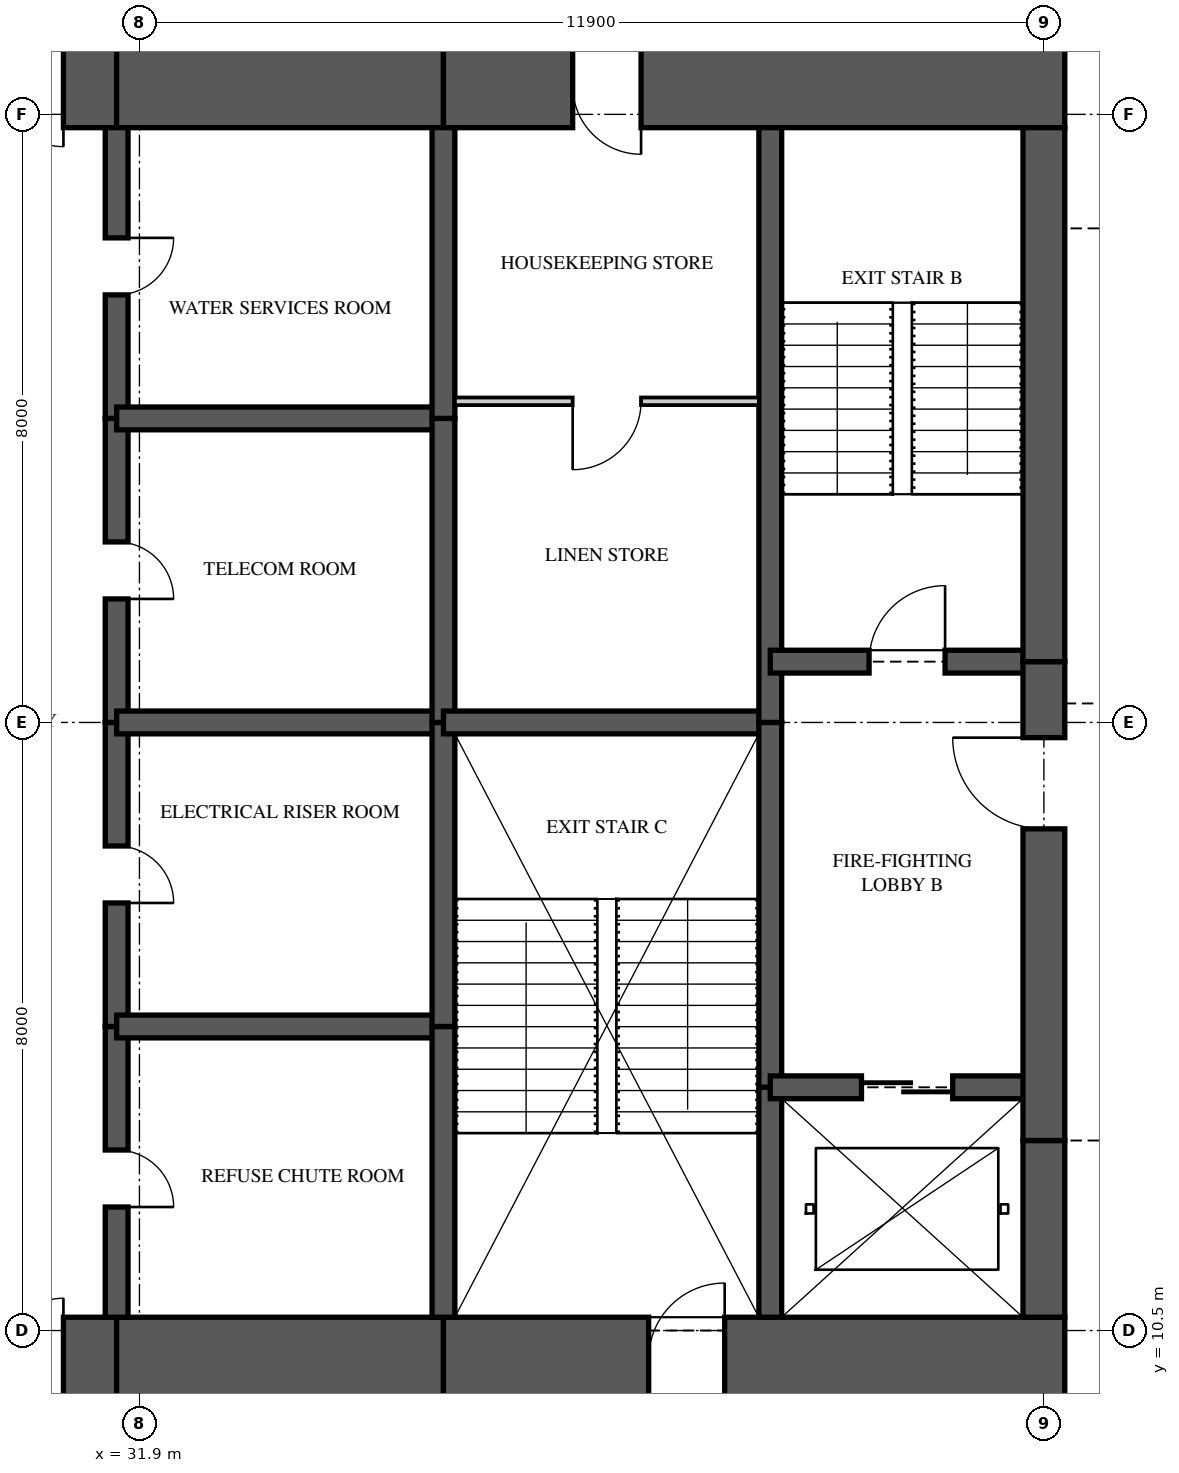
"""IFC4 building model, lengths in metres.
Left out: names, types, materials, properties, quantities, classifications, styles, units other than length and angle.
Written with IfcOpenShell. Run it as: python <this file> out.ifc"""

import sys

from ifc_helpers import new_model, si_unit, direction, frame, frame_2d, origin, place, context, subcontext, project, spatial, rectangle, extrude, element, fill, save


model = new_model("IFC4")
c1 = context("Model", 3, precision=1e-05, world=origin(), true_north=direction((0.0, 1.0)))
c2 = subcontext(c1, "Body", "Model", "MODEL_VIEW")
j1 = project(units=[si_unit("LENGTHUNIT", "METRE"), si_unit("PLANEANGLEUNIT", "RADIAN")], contexts=[c1])
p1 = place(None, origin())
s1 = spatial("IfcSite", under=j1, at=p1, CompositionType="ELEMENT")
p2 = place(p1, origin())
s2 = spatial("IfcBuilding", under=s1, at=p2, CompositionType="ELEMENT")
p3 = place(p2, frame((0.0, 0.0, 228.45)))
s3 = spatial("IfcBuildingStorey", under=s2, at=p3, CompositionType="ELEMENT", Elevation=228.45)
p4 = place(p3, frame((26.0, 10.125, 0.0), z_axis=(0.0, 0.0, 1.0), x_axis=(1.0, 0.0, 0.0)))
e1 = element("IfcWall", 1, at=p4, inside=s3, PredefinedType="SHEAR", context=c2, shape_type="SweptSolid", body=[
    extrude(rectangle(XDim=5.6, YDim=1.1, at=frame_2d((2.8, 0.0))), origin(), (0.0, 0.0, 1.0), 3.5),
])
p5 = place(p4, frame((3.3, 0.0, 0.0)))
e2 = element("IfcOpeningElement", 2, at=p5, cuts=e1, PredefinedType="OPENING", context=c2, shape_type="SweptSolid", body=[
    extrude(rectangle(XDim=1.6, YDim=2.1, at=frame_2d((0.8, 1.05))), frame((0.0, 0.56, 0.0), z_axis=(0.0, -1.0, 0.0), x_axis=(1.0, 0.0, 0.0)), (0.0, 0.0, 1.0), 1.12),
])
p6 = place(p3, frame((31.6, 10.125, 0.0), z_axis=(0.0, 0.0, 1.0), x_axis=(1.0, 0.0, 0.0)))
e3 = element("IfcWall", 3, at=p6, inside=s3, PredefinedType="SHEAR", context=c2, shape_type="SweptSolid", body=[
    extrude(rectangle(XDim=4.3, YDim=1.1, at=frame_2d((2.15, 0.0))), origin(), (0.0, 0.0, 1.0), 3.5),
])
p7 = place(p3, frame((35.9, 10.125, 0.0), z_axis=(0.0, 0.0, 1.0), x_axis=(1.0, 0.0, 0.0)))
e4 = element("IfcWall", 4, at=p7, inside=s3, PredefinedType="SHEAR", context=c2, shape_type="SweptSolid", body=[
    extrude(rectangle(XDim=8.175, YDim=1.1, at=frame_2d((4.087, 0.0))), origin(), (0.0, 0.0, 1.0), 3.5),
])
p8 = place(p7, frame((2.7, 0.0, 0.0)))
e5 = element("IfcOpeningElement", 5, at=p8, cuts=e4, PredefinedType="OPENING", context=c2, shape_type="SweptSolid", body=[
    extrude(rectangle(XDim=1.0, YDim=2.1, at=frame_2d((0.5, 1.05))), frame((0.0, 0.56, 0.0), z_axis=(0.0, -1.0, 0.0), x_axis=(1.0, 0.0, 0.0)), (0.0, 0.0, 1.0), 1.12),
])
p9 = place(p3, frame((44.075, 26.875, 0.0), z_axis=(0.0, 0.0, 1.0), x_axis=(-1.0, 0.0, 0.0)))
e6 = element("IfcWall", 6, at=p9, inside=s3, PredefinedType="SHEAR", context=c2, shape_type="SweptSolid", body=[
    extrude(rectangle(XDim=8.175, YDim=1.1, at=frame_2d((4.087, 0.0))), origin(), (0.0, 0.0, 1.0), 3.5),
])
p10 = place(p9, frame((5.575, 0.0, 0.0)))
e7 = element("IfcOpeningElement", 7, at=p10, cuts=e6, PredefinedType="OPENING", context=c2, shape_type="SweptSolid", body=[
    extrude(rectangle(XDim=0.9, YDim=2.1, at=frame_2d((0.45, 1.05))), frame((0.0, 0.56, 0.0), z_axis=(0.0, -1.0, 0.0), x_axis=(1.0, 0.0, 0.0)), (0.0, 0.0, 1.0), 1.12),
])
p11 = place(p3, frame((35.9, 26.875, 0.0), z_axis=(0.0, 0.0, 1.0), x_axis=(-1.0, 0.0, 0.0)))
e8 = element("IfcWall", 8, at=p11, inside=s3, PredefinedType="SHEAR", context=c2, shape_type="SweptSolid", body=[
    extrude(rectangle(XDim=4.3, YDim=1.1, at=frame_2d((2.15, 0.0))), origin(), (0.0, 0.0, 1.0), 3.5),
])
p12 = place(p3, frame((31.6, 26.875, 0.0), z_axis=(0.0, 0.0, 1.0), x_axis=(-1.0, 0.0, 0.0)))
e9 = element("IfcWall", 9, at=p12, inside=s3, PredefinedType="SHEAR", context=c2, shape_type="SweptSolid", body=[
    extrude(rectangle(XDim=5.6, YDim=1.1, at=frame_2d((2.8, 0.0))), origin(), (0.0, 0.0, 1.0), 3.5),
])
p13 = place(p12, frame((0.7, 0.0, 0.0)))
e10 = element("IfcOpeningElement", 10, at=p13, cuts=e9, PredefinedType="OPENING", context=c2, shape_type="SweptSolid", body=[
    extrude(rectangle(XDim=1.6, YDim=2.1, at=frame_2d((0.8, 1.05))), frame((0.0, 0.56, 0.0), z_axis=(0.0, -1.0, 0.0), x_axis=(1.0, 0.0, 0.0)), (0.0, 0.0, 1.0), 1.12),
])
p14 = place(p3, frame((43.8, 10.675, 0.0), z_axis=(0.0, 0.0, 1.0), x_axis=(0.0, 1.0, 0.0)))
e11 = element("IfcWall", 11, at=p14, inside=s3, PredefinedType="SHEAR", context=c2, shape_type="SweptSolid", body=[
    extrude(rectangle(XDim=2.325, YDim=0.55, at=frame_2d((1.163, 0.0))), origin(), (0.0, 0.0, 1.0), 3.5),
])
p15 = place(p3, frame((43.8, 13.0, 0.0), z_axis=(0.0, 0.0, 1.0), x_axis=(0.0, 1.0, 0.0)))
e12 = element("IfcWall", 12, at=p15, inside=s3, PredefinedType="SHEAR", context=c2, shape_type="SweptSolid", body=[
    extrude(rectangle(XDim=6.3, YDim=0.55, at=frame_2d((3.15, 0.0))), origin(), (0.0, 0.0, 1.0), 3.5),
])
p16 = place(p15, frame((4.1, 0.0, 0.0)))
e13 = element("IfcOpeningElement", 13, at=p16, cuts=e12, PredefinedType="OPENING", context=c2, shape_type="SweptSolid", body=[
    extrude(rectangle(XDim=1.2, YDim=2.2, at=frame_2d((0.6, 1.1))), frame((0.0, 0.285, 0.0), z_axis=(0.0, -1.0, 0.0), x_axis=(1.0, 0.0, 0.0)), (0.0, 0.0, 1.0), 0.57),
])
p17 = place(p3, frame((43.8, 19.3, 0.0), z_axis=(0.0, 0.0, 1.0), x_axis=(0.0, 1.0, 0.0)))
e14 = element("IfcWall", 14, at=p17, inside=s3, PredefinedType="SHEAR", context=c2, shape_type="SweptSolid", body=[
    extrude(rectangle(XDim=7.025, YDim=0.55, at=frame_2d((3.512, 0.0))), origin(), (0.0, 0.0, 1.0), 3.5),
])
p18 = place(p3, frame((31.6, 10.675, 0.0), z_axis=(0.0, 0.0, 1.0), x_axis=(0.0, 1.0, 0.0)))
e15 = element("IfcWall", 15, at=p18, inside=s3, PredefinedType="SHEAR", context=c2, shape_type="SweptSolid", body=[
    extrude(rectangle(XDim=3.825, YDim=0.3, at=frame_2d((1.913, 0.0))), origin(), (0.0, 0.0, 1.0), 3.5),
])
p19 = place(p18, frame((1.45, 0.0, 0.0)))
e16 = element("IfcOpeningElement", 16, at=p19, cuts=e15, PredefinedType="OPENING", context=c2, shape_type="SweptSolid", body=[
    extrude(rectangle(XDim=0.75, YDim=2.1, at=frame_2d((0.375, 1.05))), frame((0.0, 0.16, 0.0), z_axis=(0.0, -1.0, 0.0), x_axis=(1.0, 0.0, 0.0)), (0.0, 0.0, 1.0), 0.32),
])
p20 = place(p3, frame((31.6, 14.5, 0.0), z_axis=(0.0, 0.0, 1.0), x_axis=(0.0, 1.0, 0.0)))
e17 = element("IfcWall", 17, at=p20, inside=s3, PredefinedType="SHEAR", context=c2, shape_type="SweptSolid", body=[
    extrude(rectangle(XDim=4.0, YDim=0.3, at=frame_2d((2.0, 0.0))), origin(), (0.0, 0.0, 1.0), 3.5),
])
p21 = place(p20, frame((1.625, 0.0, 0.0)))
e18 = element("IfcOpeningElement", 18, at=p21, cuts=e17, PredefinedType="OPENING", context=c2, shape_type="SweptSolid", body=[
    extrude(rectangle(XDim=0.75, YDim=2.1, at=frame_2d((0.375, 1.05))), frame((0.0, 0.16, 0.0), z_axis=(0.0, -1.0, 0.0), x_axis=(1.0, 0.0, 0.0)), (0.0, 0.0, 1.0), 0.32),
])
p22 = place(p3, frame((31.6, 18.5, 0.0), z_axis=(0.0, 0.0, 1.0), x_axis=(0.0, 1.0, 0.0)))
e19 = element("IfcWall", 19, at=p22, inside=s3, PredefinedType="SHEAR", context=c2, shape_type="SweptSolid", body=[
    extrude(rectangle(XDim=4.0, YDim=0.3, at=frame_2d((2.0, 0.0))), origin(), (0.0, 0.0, 1.0), 3.5),
])
p23 = place(p22, frame((1.625, 0.0, 0.0)))
e20 = element("IfcOpeningElement", 20, at=p23, cuts=e19, PredefinedType="OPENING", context=c2, shape_type="SweptSolid", body=[
    extrude(rectangle(XDim=0.75, YDim=2.1, at=frame_2d((0.375, 1.05))), frame((0.0, 0.16, 0.0), z_axis=(0.0, -1.0, 0.0), x_axis=(1.0, 0.0, 0.0)), (0.0, 0.0, 1.0), 0.32),
])
p24 = place(p3, frame((31.6, 22.5, 0.0), z_axis=(0.0, 0.0, 1.0), x_axis=(0.0, 1.0, 0.0)))
e21 = element("IfcWall", 21, at=p24, inside=s3, PredefinedType="SHEAR", context=c2, shape_type="SweptSolid", body=[
    extrude(rectangle(XDim=3.825, YDim=0.3, at=frame_2d((1.913, 0.0))), origin(), (0.0, 0.0, 1.0), 3.5),
])
p25 = place(p24, frame((1.625, 0.0, 0.0)))
e22 = element("IfcOpeningElement", 22, at=p25, cuts=e21, PredefinedType="OPENING", context=c2, shape_type="SweptSolid", body=[
    extrude(rectangle(XDim=0.75, YDim=2.1, at=frame_2d((0.375, 1.05))), frame((0.0, 0.16, 0.0), z_axis=(0.0, -1.0, 0.0), x_axis=(1.0, 0.0, 0.0)), (0.0, 0.0, 1.0), 0.32),
])
p26 = place(p3, frame((35.9, 10.675, 0.0), z_axis=(0.0, 0.0, 1.0), x_axis=(0.0, 1.0, 0.0)))
e23 = element("IfcWall", 23, at=p26, inside=s3, PredefinedType="SHEAR", context=c2, shape_type="SweptSolid", body=[
    extrude(rectangle(XDim=3.825, YDim=0.3, at=frame_2d((1.913, 0.0))), origin(), (0.0, 0.0, 1.0), 3.5),
])
for number, where, z_axis, x_axis in (
    (24, (35.9, 14.5, 0.0), (0.0, 0.0, 1.0), (0.0, 1.0, 0.0)),
    (25, (35.9, 18.5, 0.0), (0.0, 0.0, 1.0), (0.0, 1.0, 0.0)),
):
    element("IfcWall", number, at=place(p3, frame(where, z_axis=z_axis, x_axis=x_axis)), inside=s3, PredefinedType="SHEAR", context=c2, shape_type="SweptSolid", body=[
        extrude(rectangle(XDim=4.0, YDim=0.3, at=frame_2d((2.0, 0.0))), origin(), (0.0, 0.0, 1.0), 3.5),
    ])
p27 = place(p3, frame((35.9, 22.5, 0.0), z_axis=(0.0, 0.0, 1.0), x_axis=(0.0, 1.0, 0.0)))
e26 = element("IfcWall", 26, at=p27, inside=s3, PredefinedType="SHEAR", context=c2, shape_type="SweptSolid", body=[
    extrude(rectangle(XDim=3.825, YDim=0.3, at=frame_2d((1.913, 0.0))), origin(), (0.0, 0.0, 1.0), 3.5),
])
p28 = place(p3, frame((40.2, 10.675, 0.0), z_axis=(0.0, 0.0, 1.0), x_axis=(0.0, 1.0, 0.0)))
e27 = element("IfcWall", 27, at=p28, inside=s3, PredefinedType="SHEAR", context=c2, shape_type="SweptSolid", body=[
    extrude(rectangle(XDim=3.025, YDim=0.3, at=frame_2d((1.512, 0.0))), origin(), (0.0, 0.0, 1.0), 3.5),
])
p29 = place(p3, frame((40.2, 13.7, 0.0), z_axis=(0.0, 0.0, 1.0), x_axis=(0.0, 1.0, 0.0)))
e28 = element("IfcWall", 28, at=p29, inside=s3, PredefinedType="SHEAR", context=c2, shape_type="SweptSolid", body=[
    extrude(rectangle(XDim=4.8, YDim=0.3, at=frame_2d((2.4, 0.0))), origin(), (0.0, 0.0, 1.0), 3.5),
])
p30 = place(p3, frame((40.2, 18.5, 0.0), z_axis=(0.0, 0.0, 1.0), x_axis=(0.0, 1.0, 0.0)))
e29 = element("IfcWall", 29, at=p30, inside=s3, PredefinedType="SHEAR", context=c2, shape_type="SweptSolid", body=[
    extrude(rectangle(XDim=7.825, YDim=0.3, at=frame_2d((3.913, 0.0))), origin(), (0.0, 0.0, 1.0), 3.5),
])
for number, where, z_axis, x_axis in (
    (30, (31.6, 14.5, 0.0), (0.0, 0.0, 1.0), (1.0, 0.0, 0.0)),
    (31, (31.6, 18.5, 0.0), (0.0, 0.0, 1.0), (1.0, 0.0, 0.0)),
    (32, (31.6, 22.5, 0.0), (0.0, 0.0, 1.0), (1.0, 0.0, 0.0)),
):
    element("IfcWall", number, at=place(p3, frame(where, z_axis=z_axis, x_axis=x_axis)), inside=s3, PredefinedType="SHEAR", context=c2, shape_type="SweptSolid", body=[
        extrude(rectangle(XDim=4.3, YDim=0.3, at=frame_2d((2.15, 0.0))), origin(), (0.0, 0.0, 1.0), 3.5),
    ])
p31 = place(p3, frame((35.9, 18.5, 0.0), z_axis=(0.0, 0.0, 1.0), x_axis=(1.0, 0.0, 0.0)))
e33 = element("IfcWall", 33, at=p31, inside=s3, PredefinedType="SHEAR", context=c2, shape_type="SweptSolid", body=[
    extrude(rectangle(XDim=4.3, YDim=0.3, at=frame_2d((2.15, 0.0))), origin(), (0.0, 0.0, 1.0), 3.5),
])
p32 = place(p3, frame((40.2, 13.7, 0.0), z_axis=(0.0, 0.0, 1.0), x_axis=(1.0, 0.0, 0.0)))
e34 = element("IfcWall", 34, at=p32, inside=s3, PredefinedType="SHEAR", context=c2, shape_type="SweptSolid", body=[
    extrude(rectangle(XDim=3.6, YDim=0.3, at=frame_2d((1.8, 0.0))), origin(), (0.0, 0.0, 1.0), 3.5),
])
p33 = place(p32, frame((1.2, 0.0, 0.0)))
e35 = element("IfcOpeningElement", 35, at=p33, cuts=e34, PredefinedType="OPENING", context=c2, shape_type="SweptSolid", body=[
    extrude(rectangle(XDim=1.2, YDim=2.1, at=frame_2d((0.6, 1.05))), frame((0.0, 0.16, 0.0), z_axis=(0.0, -1.0, 0.0), x_axis=(1.0, 0.0, 0.0)), (0.0, 0.0, 1.0), 0.32),
])
p34 = place(p3, frame((40.2, 19.3, 0.0), z_axis=(0.0, 0.0, 1.0), x_axis=(1.0, 0.0, 0.0)))
e36 = element("IfcWall", 36, at=p34, inside=s3, PredefinedType="SHEAR", context=c2, shape_type="SweptSolid", body=[
    extrude(rectangle(XDim=3.6, YDim=0.3, at=frame_2d((1.8, 0.0))), origin(), (0.0, 0.0, 1.0), 3.5),
])
p35 = place(p34, frame((1.3, 0.0, 0.0)))
e37 = element("IfcOpeningElement", 37, at=p35, cuts=e36, PredefinedType="OPENING", context=c2, shape_type="SweptSolid", body=[
    extrude(rectangle(XDim=1.0, YDim=2.1, at=frame_2d((0.5, 1.05))), frame((0.0, 0.16, 0.0), z_axis=(0.0, -1.0, 0.0), x_axis=(1.0, 0.0, 0.0)), (0.0, 0.0, 1.0), 0.32),
])
p36 = place(p3, frame((36.05, 22.725, 0.0), z_axis=(0.0, 0.0, 1.0), x_axis=(1.0, 0.0, 0.0)))
e38 = element("IfcWall", 38, at=p36, inside=s3, PredefinedType="PARTITIONING", context=c2, shape_type="SweptSolid", body=[
    extrude(rectangle(XDim=4.0, YDim=0.1, at=frame_2d((2.0, 0.0))), origin(), (0.0, 0.0, 1.0), 3.26),
])
p37 = place(p36, frame((1.55, 0.0, 0.0)))
e39 = element("IfcOpeningElement", 39, at=p37, cuts=e38, PredefinedType="OPENING", context=c2, shape_type="SweptSolid", body=[
    extrude(rectangle(XDim=0.9, YDim=2.1, at=frame_2d((0.45, 1.05))), frame((0.0, 0.06, 0.0), z_axis=(0.0, -1.0, 0.0), x_axis=(1.0, 0.0, 0.0)), (0.0, 0.0, 1.0), 0.12),
])
p38 = place(p37, frame((0.9, 0.0, 0.0), z_axis=(0.0, 0.0, 1.0), x_axis=(-1.0, 0.0, 0.0)))
e40 = element("IfcDoor", 40, at=p38, inside=s3, OperationType="SINGLE_SWING_RIGHT", PredefinedType="DOOR", context=c2, shape_type="SweptSolid", body=[
    extrude(rectangle(XDim=0.9, YDim=2.1, at=frame_2d((0.45, 1.05))), frame((0.0, 0.025, 0.0), z_axis=(0.0, -1.0, 0.0), x_axis=(1.0, 0.0, 0.0)), (0.0, 0.0, 1.0), 0.05),
])
fill(e39, e40)
p39 = place(p35, origin())
e41 = element("IfcDoor", 41, at=p39, inside=s3, OperationType="SINGLE_SWING_RIGHT", PredefinedType="DOOR", context=c2, shape_type="SweptSolid", body=[
    extrude(rectangle(XDim=1.0, YDim=2.1, at=frame_2d((0.5, 1.05))), frame((0.0, 0.025, 0.0), z_axis=(0.0, -1.0, 0.0), x_axis=(1.0, 0.0, 0.0)), (0.0, 0.0, 1.0), 0.05),
])
fill(e37, e41)
p40 = place(p16, origin())
e42 = element("IfcDoor", 42, at=p40, inside=s3, OperationType="SINGLE_SWING_RIGHT", PredefinedType="DOOR", context=c2, shape_type="SweptSolid", body=[
    extrude(rectangle(XDim=1.2, YDim=2.2, at=frame_2d((0.6, 1.1))), frame((0.0, 0.025, 0.0), z_axis=(0.0, -1.0, 0.0), x_axis=(1.0, 0.0, 0.0)), (0.0, 0.0, 1.0), 0.05),
])
fill(e13, e42)
p41 = place(p33, origin())
e43 = element("IfcDoor", 43, at=p41, inside=s3, OperationType="SLIDING_TO_LEFT", PredefinedType="DOOR", context=c2, shape_type="SweptSolid", body=[
    extrude(rectangle(XDim=1.2, YDim=2.1, at=frame_2d((0.6, 1.05))), frame((0.0, 0.025, 0.0), z_axis=(0.0, -1.0, 0.0), x_axis=(1.0, 0.0, 0.0)), (0.0, 0.0, 1.0), 0.05),
])
fill(e35, e43)
p42 = place(p5, origin())
e44 = element("IfcDoor", 44, at=p42, inside=s3, OperationType="DOUBLE_DOOR_SINGLE_SWING", PredefinedType="DOOR", context=c2, shape_type="SweptSolid", body=[
    extrude(rectangle(XDim=1.6, YDim=2.1, at=frame_2d((0.8, 1.05))), frame((0.0, 0.025, 0.0), z_axis=(0.0, -1.0, 0.0), x_axis=(1.0, 0.0, 0.0)), (0.0, 0.0, 1.0), 0.05),
])
fill(e2, e44)
p43 = place(p13, origin())
e45 = element("IfcDoor", 45, at=p43, inside=s3, OperationType="DOUBLE_DOOR_SINGLE_SWING", PredefinedType="DOOR", context=c2, shape_type="SweptSolid", body=[
    extrude(rectangle(XDim=1.6, YDim=2.1, at=frame_2d((0.8, 1.05))), frame((0.0, 0.025, 0.0), z_axis=(0.0, -1.0, 0.0), x_axis=(1.0, 0.0, 0.0)), (0.0, 0.0, 1.0), 0.05),
])
fill(e10, e45)
p44 = place(p19, frame((0.75, 0.0, 0.0), z_axis=(0.0, 0.0, 1.0), x_axis=(-1.0, 0.0, 0.0)))
e46 = element("IfcDoor", 46, at=p44, inside=s3, OperationType="SINGLE_SWING_RIGHT", PredefinedType="DOOR", context=c2, shape_type="SweptSolid", body=[
    extrude(rectangle(XDim=0.75, YDim=2.1, at=frame_2d((0.375, 1.05))), frame((0.0, 0.025, 0.0), z_axis=(0.0, -1.0, 0.0), x_axis=(1.0, 0.0, 0.0)), (0.0, 0.0, 1.0), 0.05),
])
fill(e16, e46)
p45 = place(p21, frame((0.75, 0.0, 0.0), z_axis=(0.0, 0.0, 1.0), x_axis=(-1.0, 0.0, 0.0)))
e47 = element("IfcDoor", 47, at=p45, inside=s3, OperationType="SINGLE_SWING_RIGHT", PredefinedType="DOOR", context=c2, shape_type="SweptSolid", body=[
    extrude(rectangle(XDim=0.75, YDim=2.1, at=frame_2d((0.375, 1.05))), frame((0.0, 0.025, 0.0), z_axis=(0.0, -1.0, 0.0), x_axis=(1.0, 0.0, 0.0)), (0.0, 0.0, 1.0), 0.05),
])
fill(e18, e47)
p46 = place(p23, frame((0.75, 0.0, 0.0), z_axis=(0.0, 0.0, 1.0), x_axis=(-1.0, 0.0, 0.0)))
e48 = element("IfcDoor", 48, at=p46, inside=s3, OperationType="SINGLE_SWING_RIGHT", PredefinedType="DOOR", context=c2, shape_type="SweptSolid", body=[
    extrude(rectangle(XDim=0.75, YDim=2.1, at=frame_2d((0.375, 1.05))), frame((0.0, 0.025, 0.0), z_axis=(0.0, -1.0, 0.0), x_axis=(1.0, 0.0, 0.0)), (0.0, 0.0, 1.0), 0.05),
])
fill(e20, e48)
p47 = place(p25, frame((0.75, 0.0, 0.0), z_axis=(0.0, 0.0, 1.0), x_axis=(-1.0, 0.0, 0.0)))
e49 = element("IfcDoor", 49, at=p47, inside=s3, OperationType="SINGLE_SWING_LEFT", PredefinedType="DOOR", context=c2, shape_type="SweptSolid", body=[
    extrude(rectangle(XDim=0.75, YDim=2.1, at=frame_2d((0.375, 1.05))), frame((0.0, 0.025, 0.0), z_axis=(0.0, -1.0, 0.0), x_axis=(1.0, 0.0, 0.0)), (0.0, 0.0, 1.0), 0.05),
])
fill(e22, e49)
p48 = place(p8, origin())
e50 = element("IfcDoor", 50, at=p48, inside=s3, OperationType="SINGLE_SWING_RIGHT", PredefinedType="DOOR", context=c2, shape_type="SweptSolid", body=[
    extrude(rectangle(XDim=1.0, YDim=2.1, at=frame_2d((0.5, 1.05))), frame((0.0, 0.025, 0.0), z_axis=(0.0, -1.0, 0.0), x_axis=(1.0, 0.0, 0.0)), (0.0, 0.0, 1.0), 0.05),
])
fill(e5, e50)
p49 = place(p10, origin())
e51 = element("IfcDoor", 51, at=p49, inside=s3, OperationType="SINGLE_SWING_LEFT", PredefinedType="DOOR", context=c2, shape_type="SweptSolid", body=[
    extrude(rectangle(XDim=0.9, YDim=2.1, at=frame_2d((0.45, 1.05))), frame((0.0, 0.47, 0.0), z_axis=(0.0, -1.0, 0.0), x_axis=(1.0, 0.0, 0.0)), (0.0, 0.0, 1.0), 0.8),
])
fill(e7, e51)
save(model, sys.argv[1])
